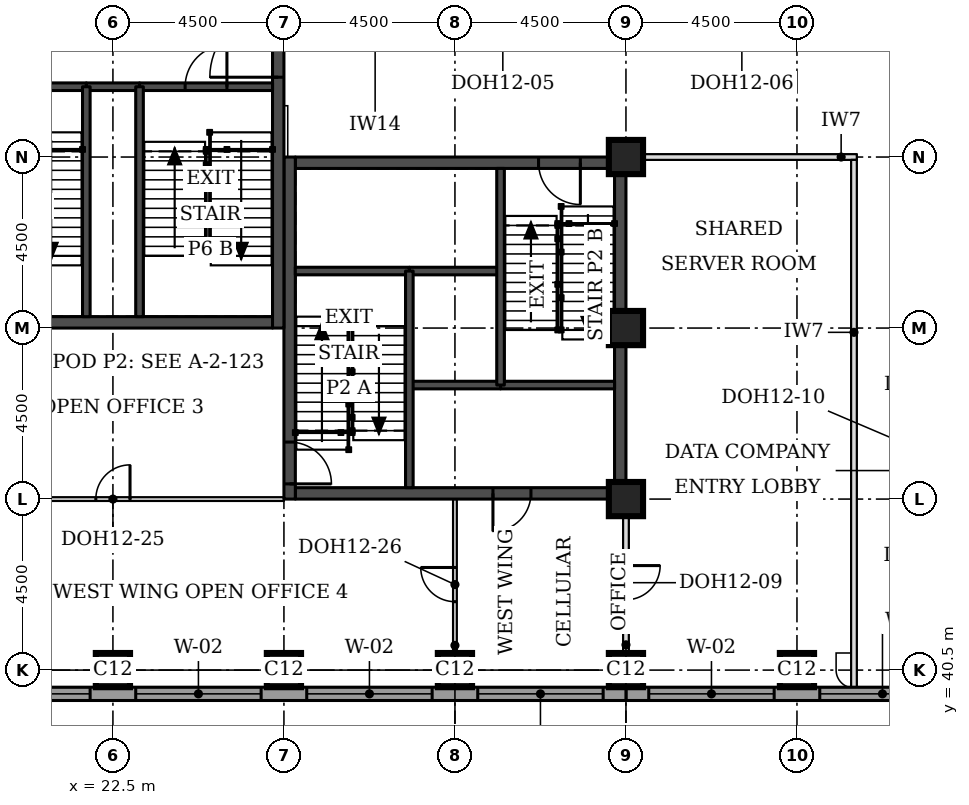
"""IFC4 building model, lengths in metres.
Left out: names, types, materials, properties, quantities, classifications, styles, units other than length and angle.
Written with IfcOpenShell. Run it as: python <this file> out.ifc"""

import sys

from ifc_helpers import new_model, si_unit, direction, frame, frame_2d, origin, origin_2d, place, context, subcontext, project, spatial, rectangle, extrude, element, fill, save


model = new_model("IFC4")
c1 = context("Model", 3, precision=1e-05, world=origin(), true_north=direction((0.0, 1.0)))
c2 = subcontext(c1, "Body", "Model", "MODEL_VIEW")
j1 = project(units=[si_unit("LENGTHUNIT", "METRE"), si_unit("PLANEANGLEUNIT", "RADIAN")], contexts=[c1])
p1 = place(None, origin())
s1 = spatial("IfcSite", under=j1, at=p1, CompositionType="ELEMENT")
p2 = place(p1, origin())
s2 = spatial("IfcBuilding", under=s1, at=p2, CompositionType="ELEMENT")
p3 = place(p2, frame((0.0, 0.0, 248.9)))
s3 = spatial("IfcBuildingStorey", under=s2, at=p3, CompositionType="ELEMENT", Elevation=248.9)
for number, where, z_axis, x_axis in (
    (1, (22.5, 40.5, 0.0), (0.0, 0.0, 1.0), (1.0, 0.0, 0.0)),
    (2, (27.0, 40.5, 0.0), (0.0, 0.0, 1.0), (1.0, 0.0, 0.0)),
    (3, (31.5, 40.5, 0.0), (0.0, 0.0, 1.0), (1.0, 0.0, 0.0)),
    (4, (36.0, 40.5, 0.0), (0.0, 0.0, 1.0), (1.0, 0.0, 0.0)),
    (5, (40.5, 40.5, 0.0), (0.0, 0.0, 1.0), (1.0, 0.0, 0.0)),
    (6, (36.0, 45.0, 0.0), (0.0, 0.0, 1.0), (1.0, 0.0, 0.0)),
    (7, (36.0, 49.5, 0.0), (0.0, 0.0, 1.0), (1.0, 0.0, 0.0)),
    (8, (36.0, 54.0, 0.0), (0.0, 0.0, 1.0), (1.0, 0.0, 0.0)),
):
    element("IfcColumn", number, at=place(p3, frame(where, z_axis=z_axis, x_axis=x_axis)), inside=s3, PredefinedType="COLUMN", context=c2, shape_type="SweptSolid", body=[
        extrude(rectangle(XDim=0.9, YDim=0.9, at=origin_2d()), origin(), (0.0, 0.0, 1.0), 3.7),
    ])
p4 = place(p3, frame((27.3, 45.15, 0.0), z_axis=(0.0, 0.0, 1.0), x_axis=(1.0, 0.0, 0.0)))
e9 = element("IfcWall", 9, at=p4, inside=s3, PredefinedType="SHEAR", context=c2, shape_type="SweptSolid", body=[
    extrude(rectangle(XDim=8.4, YDim=0.3, at=frame_2d((4.2, 0.0))), origin(), (0.0, 0.0, 1.0), 3.7),
])
p5 = place(p4, frame((5.2, 0.0, 0.0)))
e10 = element("IfcOpeningElement", 10, at=p5, cuts=e9, PredefinedType="OPENING", context=c2, shape_type="SweptSolid", body=[
    extrude(rectangle(XDim=1.0, YDim=2.1, at=frame_2d((0.5, 1.05))), frame((0.0, 0.16, 0.0), z_axis=(0.0, -1.0, 0.0), x_axis=(1.0, 0.0, 0.0)), (0.0, 0.0, 1.0), 0.32),
])
p6 = place(p3, frame((27.3, 53.85, 0.0), z_axis=(0.0, 0.0, 1.0), x_axis=(1.0, 0.0, 0.0)))
e11 = element("IfcWall", 11, at=p6, inside=s3, PredefinedType="SHEAR", context=c2, shape_type="SweptSolid", body=[
    extrude(rectangle(XDim=8.4, YDim=0.3, at=frame_2d((4.2, 0.0))), origin(), (0.0, 0.0, 1.0), 3.7),
])
p7 = place(p6, frame((6.4, 0.0, 0.0)))
e12 = element("IfcOpeningElement", 12, at=p7, cuts=e11, PredefinedType="OPENING", context=c2, shape_type="SweptSolid", body=[
    extrude(rectangle(XDim=1.1, YDim=2.1, at=frame_2d((0.55, 1.05))), frame((0.0, 0.16, 0.0), z_axis=(0.0, -1.0, 0.0), x_axis=(1.0, 0.0, 0.0)), (0.0, 0.0, 1.0), 0.32),
])
p8 = place(p3, frame((27.15, 45.0, 0.0), z_axis=(0.0, 0.0, 1.0), x_axis=(0.0, 1.0, 0.0)))
e13 = element("IfcWall", 13, at=p8, inside=s3, PredefinedType="SHEAR", context=c2, shape_type="SweptSolid", body=[
    extrude(rectangle(XDim=9.0, YDim=0.3, at=frame_2d((4.5, 0.0))), origin(), (0.0, 0.0, 1.0), 3.7),
])
p9 = place(p8, frame((0.4, 0.0, 0.0)))
e14 = element("IfcOpeningElement", 14, at=p9, cuts=e13, PredefinedType="OPENING", context=c2, shape_type="SweptSolid", body=[
    extrude(rectangle(XDim=1.1, YDim=2.1, at=frame_2d((0.55, 1.05))), frame((0.0, 0.16, 0.0), z_axis=(0.0, -1.0, 0.0), x_axis=(1.0, 0.0, 0.0)), (0.0, 0.0, 1.0), 0.32),
])
p10 = place(p3, frame((35.85, 45.0, 0.0), z_axis=(0.0, 0.0, 1.0), x_axis=(0.0, 1.0, 0.0)))
e15 = element("IfcWall", 15, at=p10, inside=s3, PredefinedType="SHEAR", context=c2, shape_type="SweptSolid", body=[
    extrude(rectangle(XDim=9.0, YDim=0.3, at=frame_2d((4.5, 0.0))), origin(), (0.0, 0.0, 1.0), 3.7),
])
p11 = place(p3, frame((18.3, 49.65, 0.0), z_axis=(0.0, 0.0, 1.0), x_axis=(1.0, 0.0, 0.0)))
e16 = element("IfcWall", 16, at=p11, inside=s3, PredefinedType="SHEAR", context=c2, shape_type="SweptSolid", body=[
    extrude(rectangle(XDim=8.4, YDim=0.3, at=frame_2d((4.2, 0.0))), origin(), (0.0, 0.0, 1.0), 3.7),
])
p12 = place(p3, frame((26.85, 49.5, 0.0), z_axis=(0.0, 0.0, 1.0), x_axis=(0.0, 1.0, 0.0)))
e17 = element("IfcWall", 17, at=p12, inside=s3, PredefinedType="SHEAR", context=c2, shape_type="SweptSolid", body=[
    extrude(rectangle(XDim=9.0, YDim=0.3, at=frame_2d((4.5, 0.0))), origin(), (0.0, 0.0, 1.0), 3.7),
])
p13 = place(p12, frame((6.6, 0.0, 0.0)))
e18 = element("IfcOpeningElement", 18, at=p13, cuts=e17, PredefinedType="OPENING", context=c2, shape_type="SweptSolid", body=[
    extrude(rectangle(XDim=1.8, YDim=2.1, at=frame_2d((0.9, 1.05))), frame((0.0, 0.16, 0.0), z_axis=(0.0, -1.0, 0.0), x_axis=(1.0, 0.0, 0.0)), (0.0, 0.0, 1.0), 0.32),
])
p14 = place(p3, frame((36.0, 39.875, 0.0), z_axis=(0.0, 0.0, 1.0), x_axis=(1.0, 0.0, 0.0)))
e19 = element("IfcWall", 19, at=p14, inside=s3, PredefinedType="STANDARD", context=c2, shape_type="SweptSolid", body=[
    extrude(rectangle(XDim=36.331, YDim=0.35, at=frame_2d((18.166, 0.0))), origin(), (0.0, 0.0, 1.0), 3.525),
])
p15 = place(p14, frame((0.6, 0.0, 0.9)))
e20 = element("IfcOpeningElement", 20, at=p15, cuts=e19, PredefinedType="OPENING", context=c2, shape_type="SweptSolid", body=[
    extrude(rectangle(XDim=3.3, YDim=1.9, at=frame_2d((1.65, 0.95))), frame((0.0, 0.185, 0.0), z_axis=(0.0, -1.0, 0.0), x_axis=(1.0, 0.0, 0.0)), (0.0, 0.0, 1.0), 0.37),
])
p16 = place(p14, frame((5.1, 0.0, 0.9)))
e21 = element("IfcOpeningElement", 21, at=p16, cuts=e19, PredefinedType="OPENING", context=c2, shape_type="SweptSolid", body=[
    extrude(rectangle(XDim=3.3, YDim=1.9, at=frame_2d((1.65, 0.95))), frame((0.0, 0.185, 0.0), z_axis=(0.0, -1.0, 0.0), x_axis=(1.0, 0.0, 0.0)), (0.0, 0.0, 1.0), 0.37),
])
p17 = place(p14, frame((9.6, 0.0, 0.9)))
e22 = element("IfcOpeningElement", 22, at=p17, cuts=e19, PredefinedType="OPENING", context=c2, shape_type="SweptSolid", body=[
    extrude(rectangle(XDim=3.3, YDim=1.9, at=frame_2d((1.65, 0.95))), frame((0.0, 0.185, 0.0), z_axis=(0.0, -1.0, 0.0), x_axis=(1.0, 0.0, 0.0)), (0.0, 0.0, 1.0), 0.37),
])
p18 = place(p14, frame((14.1, 0.0, 0.9)))
e23 = element("IfcOpeningElement", 23, at=p18, cuts=e19, PredefinedType="OPENING", context=c2, shape_type="SweptSolid", body=[
    extrude(rectangle(XDim=3.3, YDim=1.9, at=frame_2d((1.65, 0.95))), frame((0.0, 0.185, 0.0), z_axis=(0.0, -1.0, 0.0), x_axis=(1.0, 0.0, 0.0)), (0.0, 0.0, 1.0), 0.37),
])
p19 = place(p14, frame((18.6, 0.0, 0.9)))
e24 = element("IfcOpeningElement", 24, at=p19, cuts=e19, PredefinedType="OPENING", context=c2, shape_type="SweptSolid", body=[
    extrude(rectangle(XDim=3.3, YDim=1.9, at=frame_2d((1.65, 0.95))), frame((0.0, 0.185, 0.0), z_axis=(0.0, -1.0, 0.0), x_axis=(1.0, 0.0, 0.0)), (0.0, 0.0, 1.0), 0.37),
])
p20 = place(p14, frame((23.1, 0.0, 0.9)))
e25 = element("IfcOpeningElement", 25, at=p20, cuts=e19, PredefinedType="OPENING", context=c2, shape_type="SweptSolid", body=[
    extrude(rectangle(XDim=3.3, YDim=1.9, at=frame_2d((1.65, 0.95))), frame((0.0, 0.185, 0.0), z_axis=(0.0, -1.0, 0.0), x_axis=(1.0, 0.0, 0.0)), (0.0, 0.0, 1.0), 0.37),
])
p21 = place(p14, frame((27.6, 0.0, 0.9)))
e26 = element("IfcOpeningElement", 26, at=p21, cuts=e19, PredefinedType="OPENING", context=c2, shape_type="SweptSolid", body=[
    extrude(rectangle(XDim=3.3, YDim=1.9, at=frame_2d((1.65, 0.95))), frame((0.0, 0.185, 0.0), z_axis=(0.0, -1.0, 0.0), x_axis=(1.0, 0.0, 0.0)), (0.0, 0.0, 1.0), 0.37),
])
p22 = place(p14, frame((32.1, 0.0, 0.9)))
e27 = element("IfcOpeningElement", 27, at=p22, cuts=e19, PredefinedType="OPENING", context=c2, shape_type="SweptSolid", body=[
    extrude(rectangle(XDim=3.3, YDim=1.9, at=frame_2d((1.65, 0.95))), frame((0.0, 0.185, 0.0), z_axis=(0.0, -1.0, 0.0), x_axis=(1.0, 0.0, 0.0)), (0.0, 0.0, 1.0), 0.37),
])
p23 = place(p3, frame((17.669, 39.875, 0.0), z_axis=(0.0, 0.0, 1.0), x_axis=(1.0, 0.0, 0.0)))
e28 = element("IfcWall", 28, at=p23, inside=s3, PredefinedType="STANDARD", context=c2, shape_type="SweptSolid", body=[
    extrude(rectangle(XDim=18.331, YDim=0.35, at=frame_2d((9.166, 0.0))), origin(), (0.0, 0.0, 1.0), 3.525),
])
p24 = place(p23, frame((0.931, 0.0, 0.9)))
e29 = element("IfcOpeningElement", 29, at=p24, cuts=e28, PredefinedType="OPENING", context=c2, shape_type="SweptSolid", body=[
    extrude(rectangle(XDim=3.3, YDim=1.9, at=frame_2d((1.65, 0.95))), frame((0.0, 0.185, 0.0), z_axis=(0.0, -1.0, 0.0), x_axis=(1.0, 0.0, 0.0)), (0.0, 0.0, 1.0), 0.37),
])
p25 = place(p23, frame((5.431, 0.0, 0.9)))
e30 = element("IfcOpeningElement", 30, at=p25, cuts=e28, PredefinedType="OPENING", context=c2, shape_type="SweptSolid", body=[
    extrude(rectangle(XDim=3.3, YDim=1.9, at=frame_2d((1.65, 0.95))), frame((0.0, 0.185, 0.0), z_axis=(0.0, -1.0, 0.0), x_axis=(1.0, 0.0, 0.0)), (0.0, 0.0, 1.0), 0.37),
])
p26 = place(p23, frame((9.931, 0.0, 0.9)))
e31 = element("IfcOpeningElement", 31, at=p26, cuts=e28, PredefinedType="OPENING", context=c2, shape_type="SweptSolid", body=[
    extrude(rectangle(XDim=3.3, YDim=1.9, at=frame_2d((1.65, 0.95))), frame((0.0, 0.185, 0.0), z_axis=(0.0, -1.0, 0.0), x_axis=(1.0, 0.0, 0.0)), (0.0, 0.0, 1.0), 0.37),
])
p27 = place(p23, frame((14.431, 0.0, 0.9)))
e32 = element("IfcOpeningElement", 32, at=p27, cuts=e28, PredefinedType="OPENING", context=c2, shape_type="SweptSolid", body=[
    extrude(rectangle(XDim=3.3, YDim=1.9, at=frame_2d((1.65, 0.95))), frame((0.0, 0.185, 0.0), z_axis=(0.0, -1.0, 0.0), x_axis=(1.0, 0.0, 0.0)), (0.0, 0.0, 1.0), 0.37),
])
p28 = place(p3, frame((36.45, 54.0, 0.0), z_axis=(0.0, 0.0, 1.0), x_axis=(1.0, 0.0, 0.0)))
e33 = element("IfcWall", 33, at=p28, inside=s3, PredefinedType="PARTITIONING", context=c2, shape_type="SweptSolid", body=[
    extrude(rectangle(XDim=5.625, YDim=0.15, at=frame_2d((2.812, 0.0))), origin(), (0.0, 0.0, 1.0), 3.55),
])
p29 = place(p3, frame((42.0, 40.05, 0.0), z_axis=(0.0, 0.0, 1.0), x_axis=(0.0, 1.0, 0.0)))
e34 = element("IfcWall", 34, at=p29, inside=s3, PredefinedType="PARTITIONING", context=c2, shape_type="SweptSolid", body=[
    extrude(rectangle(XDim=13.875, YDim=0.15, at=frame_2d((6.938, 0.0))), origin(), (0.0, 0.0, 1.0), 3.55),
])
p30 = place(p3, frame((36.0, 40.95, 0.0), z_axis=(0.0, 0.0, 1.0), x_axis=(0.0, 1.0, 0.0)))
e35 = element("IfcWall", 35, at=p30, inside=s3, PredefinedType="PARTITIONING", context=c2, shape_type="SweptSolid", body=[
    extrude(rectangle(XDim=3.63, YDim=0.15, at=frame_2d((1.815, 0.0))), origin(), (0.0, 0.0, 1.0), 2.8),
])
p31 = place(p30, frame((1.4, 0.0, 0.0)))
e36 = element("IfcOpeningElement", 36, at=p31, cuts=e35, PredefinedType="OPENING", context=c2, shape_type="SweptSolid", body=[
    extrude(rectangle(XDim=0.9, YDim=2.1, at=frame_2d((0.45, 1.05))), frame((0.0, 0.085, 0.0), z_axis=(0.0, -1.0, 0.0), x_axis=(1.0, 0.0, 0.0)), (0.0, 0.0, 1.0), 0.17),
])
p32 = place(p3, frame((18.0, 45.0, 0.0), z_axis=(0.0, 0.0, 1.0), x_axis=(1.0, 0.0, 0.0)))
e37 = element("IfcWall", 37, at=p32, inside=s3, PredefinedType="PARTITIONING", context=c2, shape_type="SweptSolid", body=[
    extrude(rectangle(XDim=9.0, YDim=0.1, at=frame_2d((4.5, 0.0))), origin(), (0.0, 0.0, 1.0), 2.55),
])
p33 = place(p32, frame((4.05, 0.0, 0.0)))
e38 = element("IfcOpeningElement", 38, at=p33, cuts=e37, PredefinedType="OPENING", context=c2, shape_type="SweptSolid", body=[
    extrude(rectangle(XDim=0.9, YDim=2.1, at=frame_2d((0.45, 1.05))), frame((0.0, 0.06, 0.0), z_axis=(0.0, -1.0, 0.0), x_axis=(1.0, 0.0, 0.0)), (0.0, 0.0, 1.0), 0.12),
])
p34 = place(p3, frame((31.5, 45.0, 0.0), z_axis=(0.0, 0.0, 1.0), x_axis=(0.0, -1.0, 0.0)))
e39 = element("IfcWall", 39, at=p34, inside=s3, PredefinedType="PARTITIONING", context=c2, shape_type="SweptSolid", body=[
    extrude(rectangle(XDim=4.5, YDim=0.1, at=frame_2d((2.25, 0.0))), origin(), (0.0, 0.0, 1.0), 3.55),
])
p35 = place(p34, frame((1.8, 0.0, 0.0)))
e40 = element("IfcOpeningElement", 40, at=p35, cuts=e39, PredefinedType="OPENING", context=c2, shape_type="SweptSolid", body=[
    extrude(rectangle(XDim=0.9, YDim=2.1, at=frame_2d((0.45, 1.05))), frame((0.0, 0.06, 0.0), z_axis=(0.0, -1.0, 0.0), x_axis=(1.0, 0.0, 0.0)), (0.0, 0.0, 1.0), 0.12),
])
p36 = place(p3, frame((30.3, 48.0, 0.0), z_axis=(0.0, 0.0, 1.0), x_axis=(1.0, 0.0, 0.0)))
e41 = element("IfcWall", 41, at=p36, inside=s3, PredefinedType="SOLIDWALL", context=c2, shape_type="SweptSolid", body=[
    extrude(rectangle(XDim=2.4, YDim=0.2, at=frame_2d((1.2, 0.0))), origin(), (0.0, 0.0, 1.0), 3.55),
])
p37 = place(p3, frame((32.7, 48.0, 0.0), z_axis=(0.0, 0.0, 1.0), x_axis=(1.0, 0.0, 0.0)))
e42 = element("IfcWall", 42, at=p37, inside=s3, PredefinedType="SOLIDWALL", context=c2, shape_type="SweptSolid", body=[
    extrude(rectangle(XDim=3.0, YDim=0.2, at=frame_2d((1.5, 0.0))), origin(), (0.0, 0.0, 1.0), 3.55),
])
p38 = place(p3, frame((30.3, 51.0, 0.0), z_axis=(0.0, 0.0, 1.0), x_axis=(1.0, 0.0, 0.0)))
e43 = element("IfcWall", 43, at=p38, inside=s3, PredefinedType="SOLIDWALL", context=c2, shape_type="SweptSolid", body=[
    extrude(rectangle(XDim=2.4, YDim=0.2, at=frame_2d((1.2, 0.0))), origin(), (0.0, 0.0, 1.0), 3.7),
])
p39 = place(p3, frame((27.3, 51.0, 0.0), z_axis=(0.0, 0.0, 1.0), x_axis=(1.0, 0.0, 0.0)))
e44 = element("IfcWall", 44, at=p39, inside=s3, PredefinedType="SOLIDWALL", context=c2, shape_type="SweptSolid", body=[
    extrude(rectangle(XDim=3.0, YDim=0.2, at=frame_2d((1.5, 0.0))), origin(), (0.0, 0.0, 1.0), 3.55),
])
for number, where, z_axis, x_axis in (
    (45, (30.3, 45.3, 0.0), (0.0, 0.0, 1.0), (0.0, 1.0, 0.0)),
    (46, (32.7, 48.0, 0.0), (0.0, 0.0, 1.0), (0.0, 1.0, 0.0)),
):
    element("IfcWall", number, at=place(p3, frame(where, z_axis=z_axis, x_axis=x_axis)), inside=s3, PredefinedType="SOLIDWALL", context=c2, shape_type="SweptSolid", body=[
        extrude(rectangle(XDim=5.7, YDim=0.2, at=frame_2d((2.85, 0.0))), origin(), (0.0, 0.0, 1.0), 3.55),
    ])
p40 = place(p3, frame((21.8, 55.85, 0.0), z_axis=(0.0, 0.0, 1.0), x_axis=(1.0, 0.0, 0.0)))
e47 = element("IfcWall", 47, at=p40, inside=s3, PredefinedType="SOLIDWALL", context=c2, shape_type="SweptSolid", body=[
    extrude(rectangle(XDim=1.4, YDim=0.2, at=frame_2d((0.7, 0.0))), origin(), (0.0, 0.0, 1.0), 3.55),
])
p41 = place(p3, frame((18.3, 55.85, 0.0), z_axis=(0.0, 0.0, 1.0), x_axis=(1.0, 0.0, 0.0)))
e48 = element("IfcWall", 48, at=p41, inside=s3, PredefinedType="SOLIDWALL", context=c2, shape_type="SweptSolid", body=[
    extrude(rectangle(XDim=3.5, YDim=0.2, at=frame_2d((1.75, 0.0))), origin(), (0.0, 0.0, 1.0), 3.55),
])
p42 = place(p41, frame((1.2, 0.0, 0.0)))
e49 = element("IfcOpeningElement", 49, at=p42, cuts=e48, PredefinedType="OPENING", context=c2, shape_type="SweptSolid", body=[
    extrude(rectangle(XDim=1.1, YDim=2.1, at=frame_2d((0.55, 1.05))), frame((0.0, 0.11, 0.0), z_axis=(0.0, -1.0, 0.0), x_axis=(1.0, 0.0, 0.0)), (0.0, 0.0, 1.0), 0.22),
])
p43 = place(p3, frame((23.2, 55.85, 0.0), z_axis=(0.0, 0.0, 1.0), x_axis=(1.0, 0.0, 0.0)))
e50 = element("IfcWall", 50, at=p43, inside=s3, PredefinedType="SOLIDWALL", context=c2, shape_type="SweptSolid", body=[
    extrude(rectangle(XDim=3.5, YDim=0.2, at=frame_2d((1.75, 0.0))), origin(), (0.0, 0.0, 1.0), 3.55),
])
p44 = place(p43, frame((1.2, 0.0, 0.0)))
e51 = element("IfcOpeningElement", 51, at=p44, cuts=e50, PredefinedType="OPENING", context=c2, shape_type="SweptSolid", body=[
    extrude(rectangle(XDim=1.1, YDim=2.1, at=frame_2d((0.55, 1.05))), frame((0.0, 0.11, 0.0), z_axis=(0.0, -1.0, 0.0), x_axis=(1.0, 0.0, 0.0)), (0.0, 0.0, 1.0), 0.22),
])
for number, where, z_axis, x_axis in (
    (52, (21.8, 49.8, 0.0), (0.0, 0.0, 1.0), (0.0, 1.0, 0.0)),
    (53, (23.2, 49.8, 0.0), (0.0, 0.0, 1.0), (0.0, 1.0, 0.0)),
):
    element("IfcWall", number, at=place(p3, frame(where, z_axis=z_axis, x_axis=x_axis)), inside=s3, PredefinedType="SOLIDWALL", context=c2, shape_type="SweptSolid", body=[
        extrude(rectangle(XDim=6.05, YDim=0.2, at=frame_2d((3.025, 0.0))), origin(), (0.0, 0.0, 1.0), 3.55),
    ])
p45 = place(p15, origin())
e54 = element("IfcWindow", 54, at=p45, inside=s3, PartitioningType="SINGLE_PANEL", PredefinedType="WINDOW", context=c2, shape_type="SweptSolid", body=[
    extrude(rectangle(XDim=3.3, YDim=1.9, at=frame_2d((1.65, 0.95))), frame((0.0, 0.085, 0.0), z_axis=(0.0, -1.0, 0.0), x_axis=(1.0, 0.0, 0.0)), (0.0, 0.0, 1.0), 0.06),
])
fill(e20, e54)
p46 = place(p16, origin())
e55 = element("IfcWindow", 55, at=p46, inside=s3, PartitioningType="SINGLE_PANEL", PredefinedType="WINDOW", context=c2, shape_type="SweptSolid", body=[
    extrude(rectangle(XDim=3.3, YDim=1.9, at=frame_2d((1.65, 0.95))), frame((0.0, 0.085, 0.0), z_axis=(0.0, -1.0, 0.0), x_axis=(1.0, 0.0, 0.0)), (0.0, 0.0, 1.0), 0.06),
])
fill(e21, e55)
p47 = place(p24, origin())
e56 = element("IfcWindow", 56, at=p47, inside=s3, PartitioningType="SINGLE_PANEL", PredefinedType="WINDOW", context=c2, shape_type="SweptSolid", body=[
    extrude(rectangle(XDim=3.3, YDim=1.9, at=frame_2d((1.65, 0.95))), frame((0.0, 0.085, 0.0), z_axis=(0.0, -1.0, 0.0), x_axis=(1.0, 0.0, 0.0)), (0.0, 0.0, 1.0), 0.06),
])
fill(e29, e56)
p48 = place(p25, origin())
e57 = element("IfcWindow", 57, at=p48, inside=s3, PartitioningType="SINGLE_PANEL", PredefinedType="WINDOW", context=c2, shape_type="SweptSolid", body=[
    extrude(rectangle(XDim=3.3, YDim=1.9, at=frame_2d((1.65, 0.95))), frame((0.0, 0.085, 0.0), z_axis=(0.0, -1.0, 0.0), x_axis=(1.0, 0.0, 0.0)), (0.0, 0.0, 1.0), 0.06),
])
fill(e30, e57)
p49 = place(p26, origin())
e58 = element("IfcWindow", 58, at=p49, inside=s3, PartitioningType="SINGLE_PANEL", PredefinedType="WINDOW", context=c2, shape_type="SweptSolid", body=[
    extrude(rectangle(XDim=3.3, YDim=1.9, at=frame_2d((1.65, 0.95))), frame((0.0, 0.085, 0.0), z_axis=(0.0, -1.0, 0.0), x_axis=(1.0, 0.0, 0.0)), (0.0, 0.0, 1.0), 0.06),
])
fill(e31, e58)
p50 = place(p27, origin())
e59 = element("IfcWindow", 59, at=p50, inside=s3, PartitioningType="SINGLE_PANEL", PredefinedType="WINDOW", context=c2, shape_type="SweptSolid", body=[
    extrude(rectangle(XDim=3.3, YDim=1.9, at=frame_2d((1.65, 0.95))), frame((0.0, 0.085, 0.0), z_axis=(0.0, -1.0, 0.0), x_axis=(1.0, 0.0, 0.0)), (0.0, 0.0, 1.0), 0.06),
])
fill(e32, e59)
p51 = place(p31, frame((0.9, 0.0, 0.0), z_axis=(0.0, 0.0, 1.0), x_axis=(-1.0, 0.0, 0.0)))
e60 = element("IfcDoor", 60, at=p51, inside=s3, OperationType="SINGLE_SWING_LEFT", PredefinedType="DOOR", context=c2, shape_type="SweptSolid", body=[
    extrude(rectangle(XDim=0.9, YDim=2.1, at=frame_2d((0.45, 1.05))), frame((0.0, 0.025, 0.0), z_axis=(0.0, -1.0, 0.0), x_axis=(1.0, 0.0, 0.0)), (0.0, 0.0, 1.0), 0.05),
])
fill(e36, e60)
p52 = place(p33, origin())
e61 = element("IfcDoor", 61, at=p52, inside=s3, OperationType="SINGLE_SWING_RIGHT", PredefinedType="DOOR", context=c2, shape_type="SweptSolid", body=[
    extrude(rectangle(XDim=0.9, YDim=2.1, at=frame_2d((0.45, 1.05))), frame((0.0, 0.025, 0.0), z_axis=(0.0, -1.0, 0.0), x_axis=(1.0, 0.0, 0.0)), (0.0, 0.0, 1.0), 0.05),
])
fill(e38, e61)
p53 = place(p35, frame((0.9, 0.0, 0.0), z_axis=(0.0, 0.0, 1.0), x_axis=(-1.0, 0.0, 0.0)))
e62 = element("IfcDoor", 62, at=p53, inside=s3, OperationType="SINGLE_SWING_RIGHT", PredefinedType="DOOR", context=c2, shape_type="SweptSolid", body=[
    extrude(rectangle(XDim=0.9, YDim=2.1, at=frame_2d((0.45, 1.05))), frame((0.0, 0.025, 0.0), z_axis=(0.0, -1.0, 0.0), x_axis=(1.0, 0.0, 0.0)), (0.0, 0.0, 1.0), 0.05),
])
fill(e40, e62)
p54 = place(p9, frame((1.1, 0.0, 0.0), z_axis=(0.0, 0.0, 1.0), x_axis=(-1.0, 0.0, 0.0)))
e63 = element("IfcDoor", 63, at=p54, inside=s3, OperationType="SINGLE_SWING_RIGHT", PredefinedType="DOOR", context=c2, shape_type="SweptSolid", body=[
    extrude(rectangle(XDim=1.1, YDim=2.1, at=frame_2d((0.55, 1.05))), frame((0.0, 0.025, 0.0), z_axis=(0.0, -1.0, 0.0), x_axis=(1.0, 0.0, 0.0)), (0.0, 0.0, 1.0), 0.05),
])
fill(e14, e63)
p55 = place(p7, frame((1.1, 0.0, 0.0), z_axis=(0.0, 0.0, 1.0), x_axis=(-1.0, 0.0, 0.0)))
e64 = element("IfcDoor", 64, at=p55, inside=s3, OperationType="SINGLE_SWING_LEFT", PredefinedType="DOOR", context=c2, shape_type="SweptSolid", body=[
    extrude(rectangle(XDim=1.1, YDim=2.1, at=frame_2d((0.55, 1.05))), frame((0.0, 0.025, 0.0), z_axis=(0.0, -1.0, 0.0), x_axis=(1.0, 0.0, 0.0)), (0.0, 0.0, 1.0), 0.05),
])
fill(e12, e64)
p56 = place(p5, frame((1.0, 0.0, 0.0), z_axis=(0.0, 0.0, 1.0), x_axis=(-1.0, 0.0, 0.0)))
e65 = element("IfcDoor", 65, at=p56, inside=s3, OperationType="SINGLE_SWING_RIGHT", PredefinedType="DOOR", context=c2, shape_type="SweptSolid", body=[
    extrude(rectangle(XDim=1.0, YDim=2.1, at=frame_2d((0.5, 1.05))), frame((0.0, 0.025, 0.0), z_axis=(0.0, -1.0, 0.0), x_axis=(1.0, 0.0, 0.0)), (0.0, 0.0, 1.0), 0.05),
])
fill(e10, e65)
p57 = place(p44, origin())
e66 = element("IfcDoor", 66, at=p57, inside=s3, OperationType="SINGLE_SWING_RIGHT", PredefinedType="DOOR", context=c2, shape_type="SweptSolid", body=[
    extrude(rectangle(XDim=1.1, YDim=2.1, at=frame_2d((0.55, 1.05))), frame((0.0, 0.025, 0.0), z_axis=(0.0, -1.0, 0.0), x_axis=(1.0, 0.0, 0.0)), (0.0, 0.0, 1.0), 0.05),
])
fill(e51, e66)
p58 = place(p13, origin())
e67 = element("IfcDoor", 67, at=p58, inside=s3, OperationType="SINGLE_SWING_LEFT", PredefinedType="DOOR", context=c2, shape_type="SweptSolid", body=[
    extrude(rectangle(XDim=1.8, YDim=2.1, at=frame_2d((0.9, 1.05))), frame((0.0, 0.025, 0.0), z_axis=(0.0, -1.0, 0.0), x_axis=(1.0, 0.0, 0.0)), (0.0, 0.0, 1.0), 0.05),
])
fill(e18, e67)
save(model, sys.argv[1])
